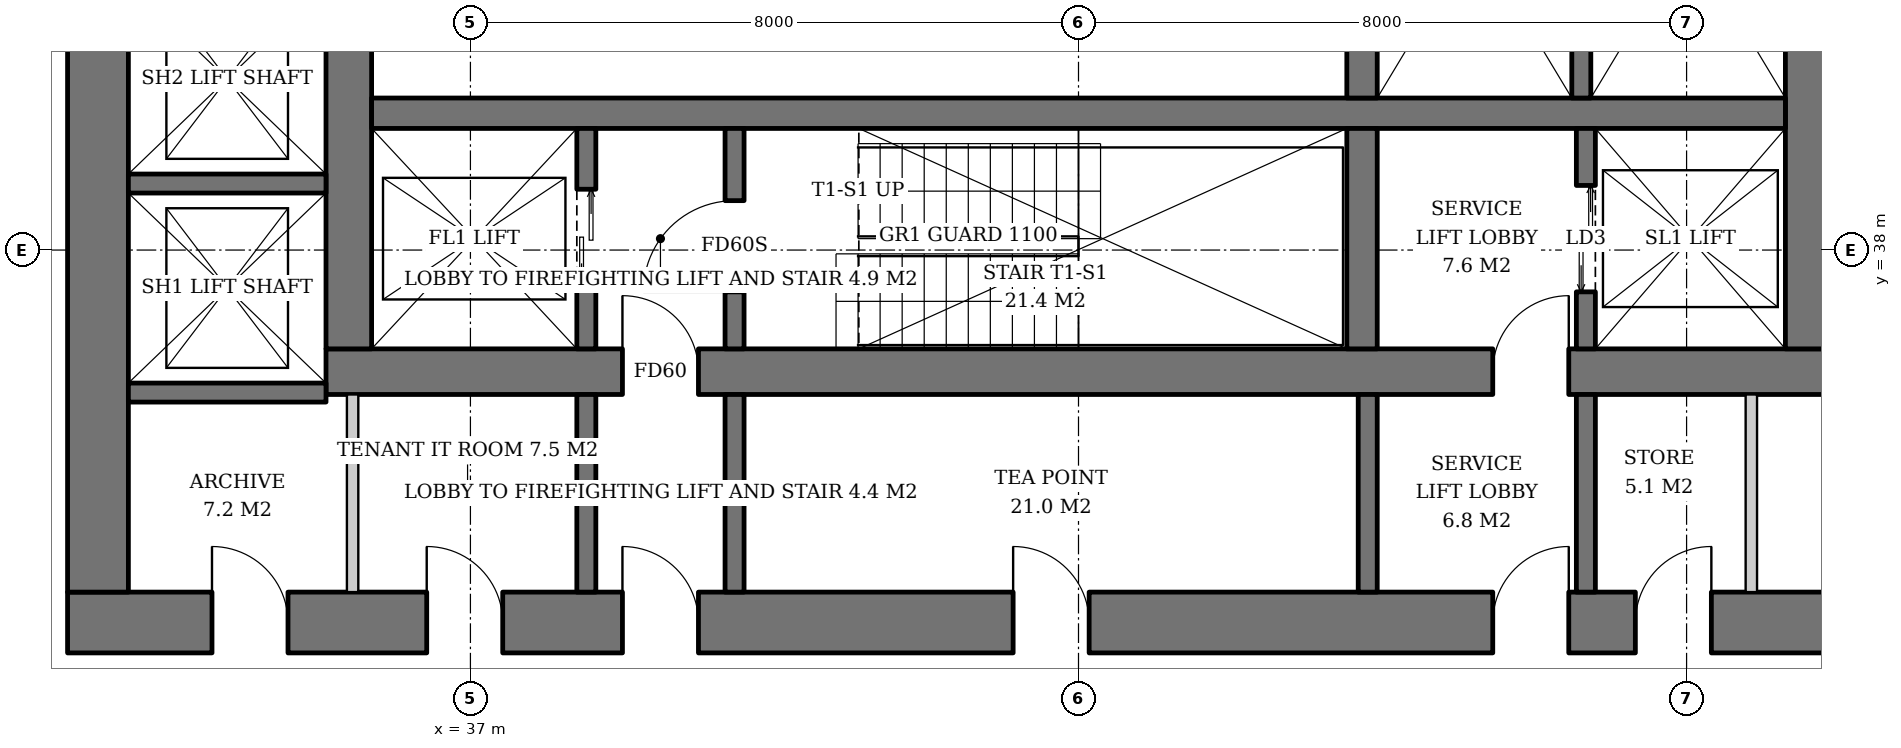
"""IFC4 building model, lengths in metres.
Left out: names, types, materials, properties, quantities, classifications, styles, units other than length and angle.
Written with IfcOpenShell. Run it as: python <this file> out.ifc"""

import sys

from ifc_helpers import new_model, si_unit, direction, frame, frame_2d, origin, place, context, subcontext, project, spatial, rectangle, extrude, element, fill, save


model = new_model("IFC4")
c1 = context("Model", 3, precision=1e-05, world=origin(), true_north=direction((0.0, 1.0)))
c2 = subcontext(c1, "Body", "Model", "MODEL_VIEW")
j1 = project(units=[si_unit("LENGTHUNIT", "METRE"), si_unit("PLANEANGLEUNIT", "RADIAN")], contexts=[c1])
p1 = place(None, origin())
s1 = spatial("IfcSite", under=j1, at=p1, CompositionType="ELEMENT")
p2 = place(p1, origin())
s2 = spatial("IfcBuilding", under=s1, at=p2, CompositionType="ELEMENT")
p3 = place(p2, frame((0.0, 0.0, 70.4)))
s3 = spatial("IfcBuildingStorey", under=s2, at=p3, CompositionType="ELEMENT", Elevation=70.4)
p4 = place(p3, frame((35.1, 36.4, 0.0), z_axis=(0.0, 0.0, 1.0), x_axis=(1.0, 0.0, 0.0)))
e1 = element("IfcWall", 1, at=p4, inside=s3, PredefinedType="SHEAR", context=c2, shape_type="SweptSolid", body=[
    extrude(rectangle(XDim=19.8, YDim=0.6, at=frame_2d((9.9, 0.0))), origin(), (0.0, 0.0, 1.0), 3.8),
])
p5 = place(p4, frame((3.9, 0.0, 0.0)))
e2 = element("IfcOpeningElement", 2, at=p5, cuts=e1, PredefinedType="OPENING", context=c2, shape_type="SweptSolid", body=[
    extrude(rectangle(XDim=1.0, YDim=2.1, at=frame_2d((0.5, 1.05))), frame((0.0, 0.31, 0.0), z_axis=(0.0, -1.0, 0.0), x_axis=(1.0, 0.0, 0.0)), (0.0, 0.0, 1.0), 0.62),
])
p6 = place(p4, frame((15.35, 0.0, 0.0)))
e3 = element("IfcOpeningElement", 3, at=p6, cuts=e1, PredefinedType="OPENING", context=c2, shape_type="SweptSolid", body=[
    extrude(rectangle(XDim=1.0, YDim=2.1, at=frame_2d((0.5, 1.05))), frame((0.0, 0.31, 0.0), z_axis=(0.0, -1.0, 0.0), x_axis=(1.0, 0.0, 0.0)), (0.0, 0.0, 1.0), 0.62),
])
p7 = place(p3, frame((35.4, 36.7, 0.0), z_axis=(0.0, 0.0, 1.0), x_axis=(0.0, 1.0, 0.0)))
e4 = element("IfcWall", 4, at=p7, inside=s3, PredefinedType="SHEAR", context=c2, shape_type="SweptSolid", body=[
    extrude(rectangle(XDim=18.6, YDim=0.6, at=frame_2d((9.3, 0.0))), origin(), (0.0, 0.0, 1.0), 3.8),
])
p8 = place(p7, frame((8.4, 0.0, 0.0)))
e5 = element("IfcOpeningElement", 5, at=p8, cuts=e4, PredefinedType="OPENING", context=c2, shape_type="SweptSolid", body=[
    extrude(rectangle(XDim=1.8, YDim=2.4, at=frame_2d((0.9, 1.2))), frame((0.0, 0.31, 0.0), z_axis=(0.0, -1.0, 0.0), x_axis=(1.0, 0.0, 0.0)), (0.0, 0.0, 1.0), 0.62),
])
p9 = place(p3, frame((54.6, 36.7, 0.0), z_axis=(0.0, 0.0, 1.0), x_axis=(0.0, 1.0, 0.0)))
e6 = element("IfcWall", 6, at=p9, inside=s3, PredefinedType="SHEAR", context=c2, shape_type="SweptSolid", body=[
    extrude(rectangle(XDim=18.6, YDim=0.6, at=frame_2d((9.3, 0.0))), origin(), (0.0, 0.0, 1.0), 3.8),
])
p10 = place(p9, frame((8.4, 0.0, 0.0)))
e7 = element("IfcOpeningElement", 7, at=p10, cuts=e6, PredefinedType="OPENING", context=c2, shape_type="SweptSolid", body=[
    extrude(rectangle(XDim=1.8, YDim=2.4, at=frame_2d((0.9, 1.2))), frame((0.0, 0.31, 0.0), z_axis=(0.0, -1.0, 0.0), x_axis=(1.0, 0.0, 0.0)), (0.0, 0.0, 1.0), 0.62),
])
p11 = place(p3, frame((31.7, 33.1, 0.0), z_axis=(0.0, 0.0, 1.0), x_axis=(1.0, 0.0, 0.0)))
e8 = element("IfcWall", 8, at=p11, inside=s3, PredefinedType="SHEAR", context=c2, shape_type="SweptSolid", body=[
    extrude(rectangle(XDim=26.6, YDim=0.8, at=frame_2d((13.3, 0.0))), origin(), (0.0, 0.0, 1.0), 3.8),
])
p12 = place(p11, frame((7.3, 0.0, 0.0)))
e9 = element("IfcOpeningElement", 9, at=p12, cuts=e8, PredefinedType="OPENING", context=c2, shape_type="SweptSolid", body=[
    extrude(rectangle(XDim=1.0, YDim=2.1, at=frame_2d((0.5, 1.05))), frame((0.0, 0.41, 0.0), z_axis=(0.0, -1.0, 0.0), x_axis=(1.0, 0.0, 0.0)), (0.0, 0.0, 1.0), 0.82),
])
p13 = place(p11, frame((18.75, 0.0, 0.0)))
e10 = element("IfcOpeningElement", 10, at=p13, cuts=e8, PredefinedType="OPENING", context=c2, shape_type="SweptSolid", body=[
    extrude(rectangle(XDim=1.0, YDim=2.1, at=frame_2d((0.5, 1.05))), frame((0.0, 0.41, 0.0), z_axis=(0.0, -1.0, 0.0), x_axis=(1.0, 0.0, 0.0)), (0.0, 0.0, 1.0), 0.82),
])
p14 = place(p11, frame((1.9, 0.0, 0.0)))
e11 = element("IfcOpeningElement", 11, at=p14, cuts=e8, PredefinedType="OPENING", context=c2, shape_type="SweptSolid", body=[
    extrude(rectangle(XDim=1.0, YDim=2.1, at=frame_2d((0.5, 1.05))), frame((0.0, 0.41, 0.0), z_axis=(0.0, -1.0, 0.0), x_axis=(1.0, 0.0, 0.0)), (0.0, 0.0, 1.0), 0.82),
])
p15 = place(p11, frame((4.725, 0.0, 0.0)))
e12 = element("IfcOpeningElement", 12, at=p15, cuts=e8, PredefinedType="OPENING", context=c2, shape_type="SweptSolid", body=[
    extrude(rectangle(XDim=1.0, YDim=2.1, at=frame_2d((0.5, 1.05))), frame((0.0, 0.41, 0.0), z_axis=(0.0, -1.0, 0.0), x_axis=(1.0, 0.0, 0.0)), (0.0, 0.0, 1.0), 0.82),
])
p16 = place(p11, frame((12.44, 0.0, 0.0)))
e13 = element("IfcOpeningElement", 13, at=p16, cuts=e8, PredefinedType="OPENING", context=c2, shape_type="SweptSolid", body=[
    extrude(rectangle(XDim=1.0, YDim=2.1, at=frame_2d((0.5, 1.05))), frame((0.0, 0.41, 0.0), z_axis=(0.0, -1.0, 0.0), x_axis=(1.0, 0.0, 0.0)), (0.0, 0.0, 1.0), 0.82),
])
p17 = place(p11, frame((20.626, 0.0, 0.0)))
e14 = element("IfcOpeningElement", 14, at=p17, cuts=e8, PredefinedType="OPENING", context=c2, shape_type="SweptSolid", body=[
    extrude(rectangle(XDim=1.0, YDim=2.1, at=frame_2d((0.5, 1.05))), frame((0.0, 0.41, 0.0), z_axis=(0.0, -1.0, 0.0), x_axis=(1.0, 0.0, 0.0)), (0.0, 0.0, 1.0), 0.82),
])
p18 = place(p11, frame((23.476, 0.0, 0.0)))
e15 = element("IfcOpeningElement", 15, at=p18, cuts=e8, PredefinedType="OPENING", context=c2, shape_type="SweptSolid", body=[
    extrude(rectangle(XDim=1.0, YDim=2.1, at=frame_2d((0.5, 1.05))), frame((0.0, 0.41, 0.0), z_axis=(0.0, -1.0, 0.0), x_axis=(1.0, 0.0, 0.0)), (0.0, 0.0, 1.0), 0.82),
])
p19 = place(p3, frame((32.1, 33.5, 0.0), z_axis=(0.0, 0.0, 1.0), x_axis=(0.0, 1.0, 0.0)))
e16 = element("IfcWall", 16, at=p19, inside=s3, PredefinedType="SHEAR", context=c2, shape_type="SweptSolid", body=[
    extrude(rectangle(XDim=25.0, YDim=0.8, at=frame_2d((12.5, 0.0))), origin(), (0.0, 0.0, 1.0), 3.8),
])
p20 = place(p19, frame((11.6, 0.0, 0.0)))
e17 = element("IfcOpeningElement", 17, at=p20, cuts=e16, PredefinedType="OPENING", context=c2, shape_type="SweptSolid", body=[
    extrude(rectangle(XDim=1.8, YDim=2.4, at=frame_2d((0.9, 1.2))), frame((0.0, 0.41, 0.0), z_axis=(0.0, -1.0, 0.0), x_axis=(1.0, 0.0, 0.0)), (0.0, 0.0, 1.0), 0.82),
])
p21 = place(p3, frame((35.7, 39.8, 0.0), z_axis=(0.0, 0.0, 1.0), x_axis=(1.0, 0.0, 0.0)))
e18 = element("IfcWall", 18, at=p21, inside=s3, PredefinedType="SHEAR", context=c2, shape_type="SweptSolid", body=[
    extrude(rectangle(XDim=18.6, YDim=0.4, at=frame_2d((9.3, 0.0))), origin(), (0.0, 0.0, 1.0), 3.8),
])
p22 = place(p3, frame((48.73, 36.7, 0.0), z_axis=(0.0, 0.0, 1.0), x_axis=(0.0, 1.0, 0.0)))
e19 = element("IfcWall", 19, at=p22, inside=s3, PredefinedType="SHEAR", context=c2, shape_type="SweptSolid", body=[
    extrude(rectangle(XDim=2.9, YDim=0.4, at=frame_2d((1.45, 0.0))), origin(), (0.0, 0.0, 1.0), 3.8),
])
p23 = place(p3, frame((48.73, 40.0, 0.0), z_axis=(0.0, 0.0, 1.0), x_axis=(0.0, 1.0, 0.0)))
e20 = element("IfcWall", 20, at=p23, inside=s3, PredefinedType="SHEAR", context=c2, shape_type="SweptSolid", body=[
    extrude(rectangle(XDim=12.0, YDim=0.4, at=frame_2d((6.0, 0.0))), origin(), (0.0, 0.0, 1.0), 3.8),
])
p24 = place(p3, frame((38.525, 36.7, 0.0), z_axis=(0.0, 0.0, 1.0), x_axis=(0.0, 1.0, 0.0)))
e21 = element("IfcWall", 21, at=p24, inside=s3, PredefinedType="SHEAR", context=c2, shape_type="SweptSolid", body=[
    extrude(rectangle(XDim=2.9, YDim=0.25, at=frame_2d((1.45, 0.0))), origin(), (0.0, 0.0, 1.0), 3.8),
])
p25 = place(p24, frame((0.8, 0.0, 0.0)))
e22 = element("IfcOpeningElement", 22, at=p25, cuts=e21, PredefinedType="OPENING", context=c2, shape_type="SweptSolid", body=[
    extrude(rectangle(XDim=1.3, YDim=2.2, at=frame_2d((0.65, 1.1))), frame((0.0, 0.135, 0.0), z_axis=(0.0, -1.0, 0.0), x_axis=(1.0, 0.0, 0.0)), (0.0, 0.0, 1.0), 0.27),
])
p26 = place(p3, frame((40.475, 36.7, 0.0), z_axis=(0.0, 0.0, 1.0), x_axis=(0.0, 1.0, 0.0)))
e23 = element("IfcWall", 23, at=p26, inside=s3, PredefinedType="SHEAR", context=c2, shape_type="SweptSolid", body=[
    extrude(rectangle(XDim=2.9, YDim=0.25, at=frame_2d((1.45, 0.0))), origin(), (0.0, 0.0, 1.0), 3.8),
])
p27 = place(p26, frame((0.75, 0.0, 0.0)))
e24 = element("IfcOpeningElement", 24, at=p27, cuts=e23, PredefinedType="OPENING", context=c2, shape_type="SweptSolid", body=[
    extrude(rectangle(XDim=1.2, YDim=2.1, at=frame_2d((0.6, 1.05))), frame((0.0, 0.135, 0.0), z_axis=(0.0, -1.0, 0.0), x_axis=(1.0, 0.0, 0.0)), (0.0, 0.0, 1.0), 0.27),
])
p28 = place(p3, frame((51.675, 36.7, 0.0), z_axis=(0.0, 0.0, 1.0), x_axis=(0.0, 1.0, 0.0)))
e25 = element("IfcWall", 25, at=p28, inside=s3, PredefinedType="SHEAR", context=c2, shape_type="SweptSolid", body=[
    extrude(rectangle(XDim=2.9, YDim=0.25, at=frame_2d((1.45, 0.0))), origin(), (0.0, 0.0, 1.0), 3.8),
])
p29 = place(p28, frame((0.75, 0.0, 0.0)))
e26 = element("IfcOpeningElement", 26, at=p29, cuts=e25, PredefinedType="OPENING", context=c2, shape_type="SweptSolid", body=[
    extrude(rectangle(XDim=1.4, YDim=2.4, at=frame_2d((0.7, 1.2))), frame((0.0, 0.135, 0.0), z_axis=(0.0, -1.0, 0.0), x_axis=(1.0, 0.0, 0.0)), (0.0, 0.0, 1.0), 0.27),
])
p30 = place(p3, frame((51.615, 44.25, 0.0), z_axis=(0.0, 0.0, 1.0), x_axis=(0.0, -1.0, 0.0)))
e27 = element("IfcWall", 27, at=p30, inside=s3, PredefinedType="SHEAR", context=c2, shape_type="SweptSolid", body=[
    extrude(rectangle(XDim=4.25, YDim=0.25, at=frame_2d((2.125, 0.0))), origin(), (0.0, 0.0, 1.0), 3.8),
])
for number, where, z_axis, x_axis in (
    (28, (32.5, 36.125, 0.0), (0.0, 0.0, 1.0), (1.0, 0.0, 0.0)),
    (29, (32.5, 38.875, 0.0), (0.0, 0.0, 1.0), (1.0, 0.0, 0.0)),
):
    element("IfcWall", number, at=place(p3, frame(where, z_axis=z_axis, x_axis=x_axis)), inside=s3, PredefinedType="SHEAR", context=c2, shape_type="SweptSolid", body=[
        extrude(rectangle(XDim=2.6, YDim=0.25, at=frame_2d((1.3, 0.0))), origin(), (0.0, 0.0, 1.0), 3.8),
    ])
for number, where, z_axis, x_axis in (
    (30, (38.525, 33.5, 0.0), (0.0, 0.0, 1.0), (0.0, 1.0, 0.0)),
    (31, (40.475, 33.5, 0.0), (0.0, 0.0, 1.0), (0.0, 1.0, 0.0)),
    (32, (48.805, 33.5, 0.0), (0.0, 0.0, 1.0), (0.0, 1.0, 0.0)),
    (33, (51.675, 33.5, 0.0), (0.0, 0.0, 1.0), (0.0, 1.0, 0.0)),
):
    element("IfcWall", number, at=place(p3, frame(where, z_axis=z_axis, x_axis=x_axis)), inside=s3, PredefinedType="SOLIDWALL", context=c2, shape_type="SweptSolid", body=[
        extrude(rectangle(XDim=2.6, YDim=0.25, at=frame_2d((1.3, 0.0))), origin(), (0.0, 0.0, 1.0), 3.62),
    ])
for number, where, z_axis, x_axis in (
    (34, (35.45, 33.5, 0.0), (0.0, 0.0, 1.0), (0.0, 1.0, 0.0)),
    (35, (53.852, 33.5, 0.0), (0.0, 0.0, 1.0), (0.0, 1.0, 0.0)),
):
    element("IfcWall", number, at=place(p3, frame(where, z_axis=z_axis, x_axis=x_axis)), inside=s3, PredefinedType="SOLIDWALL", context=c2, shape_type="SweptSolid", body=[
        extrude(rectangle(XDim=2.6, YDim=0.15, at=frame_2d((1.3, 0.0))), origin(), (0.0, 0.0, 1.0), 3.62),
    ])
p31 = place(p25, origin())
e36 = element("IfcDoor", 36, at=p31, inside=s3, OperationType="DOUBLE_DOOR_SLIDING", PredefinedType="DOOR", context=c2, shape_type="SweptSolid", body=[
    extrude(rectangle(XDim=1.3, YDim=2.2, at=frame_2d((0.65, 1.1))), frame((0.0, 0.025, 0.0), z_axis=(0.0, -1.0, 0.0), x_axis=(1.0, 0.0, 0.0)), (0.0, 0.0, 1.0), 0.05),
])
fill(e22, e36)
p32 = place(p27, origin())
e37 = element("IfcDoor", 37, at=p32, inside=s3, OperationType="SINGLE_SWING_LEFT", PredefinedType="DOOR", context=c2, shape_type="SweptSolid", body=[
    extrude(rectangle(XDim=1.2, YDim=2.1, at=frame_2d((0.6, 1.05))), frame((0.0, 0.025, 0.0), z_axis=(0.0, -1.0, 0.0), x_axis=(1.0, 0.0, 0.0)), (0.0, 0.0, 1.0), 0.05),
])
fill(e24, e37)
p33 = place(p29, origin())
e38 = element("IfcDoor", 38, at=p33, inside=s3, OperationType="DOUBLE_DOOR_SLIDING", PredefinedType="DOOR", context=c2, shape_type="SweptSolid", body=[
    extrude(rectangle(XDim=1.4, YDim=2.4, at=frame_2d((0.7, 1.2))), frame((0.0, 0.025, 0.0), z_axis=(0.0, -1.0, 0.0), x_axis=(1.0, 0.0, 0.0)), (0.0, 0.0, 1.0), 0.05),
])
fill(e26, e38)
p34 = place(p5, origin())
e39 = element("IfcDoor", 39, at=p34, inside=s3, OperationType="SINGLE_SWING_LEFT", PredefinedType="DOOR", context=c2, shape_type="SweptSolid", body=[
    extrude(rectangle(XDim=1.0, YDim=2.1, at=frame_2d((0.5, 1.05))), frame((0.0, 0.025, 0.0), z_axis=(0.0, -1.0, 0.0), x_axis=(1.0, 0.0, 0.0)), (0.0, 0.0, 1.0), 0.05),
])
fill(e2, e39)
p35 = place(p6, origin())
e40 = element("IfcDoor", 40, at=p35, inside=s3, OperationType="SINGLE_SWING_RIGHT", PredefinedType="DOOR", context=c2, shape_type="SweptSolid", body=[
    extrude(rectangle(XDim=1.0, YDim=2.1, at=frame_2d((0.5, 1.05))), frame((0.0, 0.025, 0.0), z_axis=(0.0, -1.0, 0.0), x_axis=(1.0, 0.0, 0.0)), (0.0, 0.0, 1.0), 0.05),
])
fill(e3, e40)
p36 = place(p12, origin())
e41 = element("IfcDoor", 41, at=p36, inside=s3, OperationType="SINGLE_SWING_LEFT", PredefinedType="DOOR", context=c2, shape_type="SweptSolid", body=[
    extrude(rectangle(XDim=1.0, YDim=2.1, at=frame_2d((0.5, 1.05))), frame((0.0, 0.025, 0.0), z_axis=(0.0, -1.0, 0.0), x_axis=(1.0, 0.0, 0.0)), (0.0, 0.0, 1.0), 0.05),
])
fill(e9, e41)
p37 = place(p13, origin())
e42 = element("IfcDoor", 42, at=p37, inside=s3, OperationType="SINGLE_SWING_RIGHT", PredefinedType="DOOR", context=c2, shape_type="SweptSolid", body=[
    extrude(rectangle(XDim=1.0, YDim=2.1, at=frame_2d((0.5, 1.05))), frame((0.0, 0.025, 0.0), z_axis=(0.0, -1.0, 0.0), x_axis=(1.0, 0.0, 0.0)), (0.0, 0.0, 1.0), 0.05),
])
fill(e10, e42)
p38 = place(p14, origin())
e43 = element("IfcDoor", 43, at=p38, inside=s3, OperationType="SINGLE_SWING_LEFT", PredefinedType="DOOR", context=c2, shape_type="SweptSolid", body=[
    extrude(rectangle(XDim=1.0, YDim=2.1, at=frame_2d((0.5, 1.05))), frame((0.0, 0.39, 0.0), z_axis=(0.0, -1.0, 0.0), x_axis=(1.0, 0.0, 0.0)), (0.0, 0.0, 1.0), 0.05),
])
fill(e11, e43)
p39 = place(p15, origin())
e44 = element("IfcDoor", 44, at=p39, inside=s3, OperationType="SINGLE_SWING_LEFT", PredefinedType="DOOR", context=c2, shape_type="SweptSolid", body=[
    extrude(rectangle(XDim=1.0, YDim=2.1, at=frame_2d((0.5, 1.05))), frame((0.0, 0.39, 0.0), z_axis=(0.0, -1.0, 0.0), x_axis=(1.0, 0.0, 0.0)), (0.0, 0.0, 1.0), 0.05),
])
fill(e12, e44)
p40 = place(p16, origin())
e45 = element("IfcDoor", 45, at=p40, inside=s3, OperationType="SINGLE_SWING_LEFT", PredefinedType="DOOR", context=c2, shape_type="SweptSolid", body=[
    extrude(rectangle(XDim=1.0, YDim=2.1, at=frame_2d((0.5, 1.05))), frame((0.0, 0.39, 0.0), z_axis=(0.0, -1.0, 0.0), x_axis=(1.0, 0.0, 0.0)), (0.0, 0.0, 1.0), 0.05),
])
fill(e13, e45)
p41 = place(p17, origin())
e46 = element("IfcDoor", 46, at=p41, inside=s3, OperationType="SINGLE_SWING_RIGHT", PredefinedType="DOOR", context=c2, shape_type="SweptSolid", body=[
    extrude(rectangle(XDim=1.0, YDim=2.1, at=frame_2d((0.5, 1.05))), frame((0.0, 0.39, 0.0), z_axis=(0.0, -1.0, 0.0), x_axis=(1.0, 0.0, 0.0)), (0.0, 0.0, 1.0), 0.05),
])
fill(e14, e46)
save(model, sys.argv[1])
